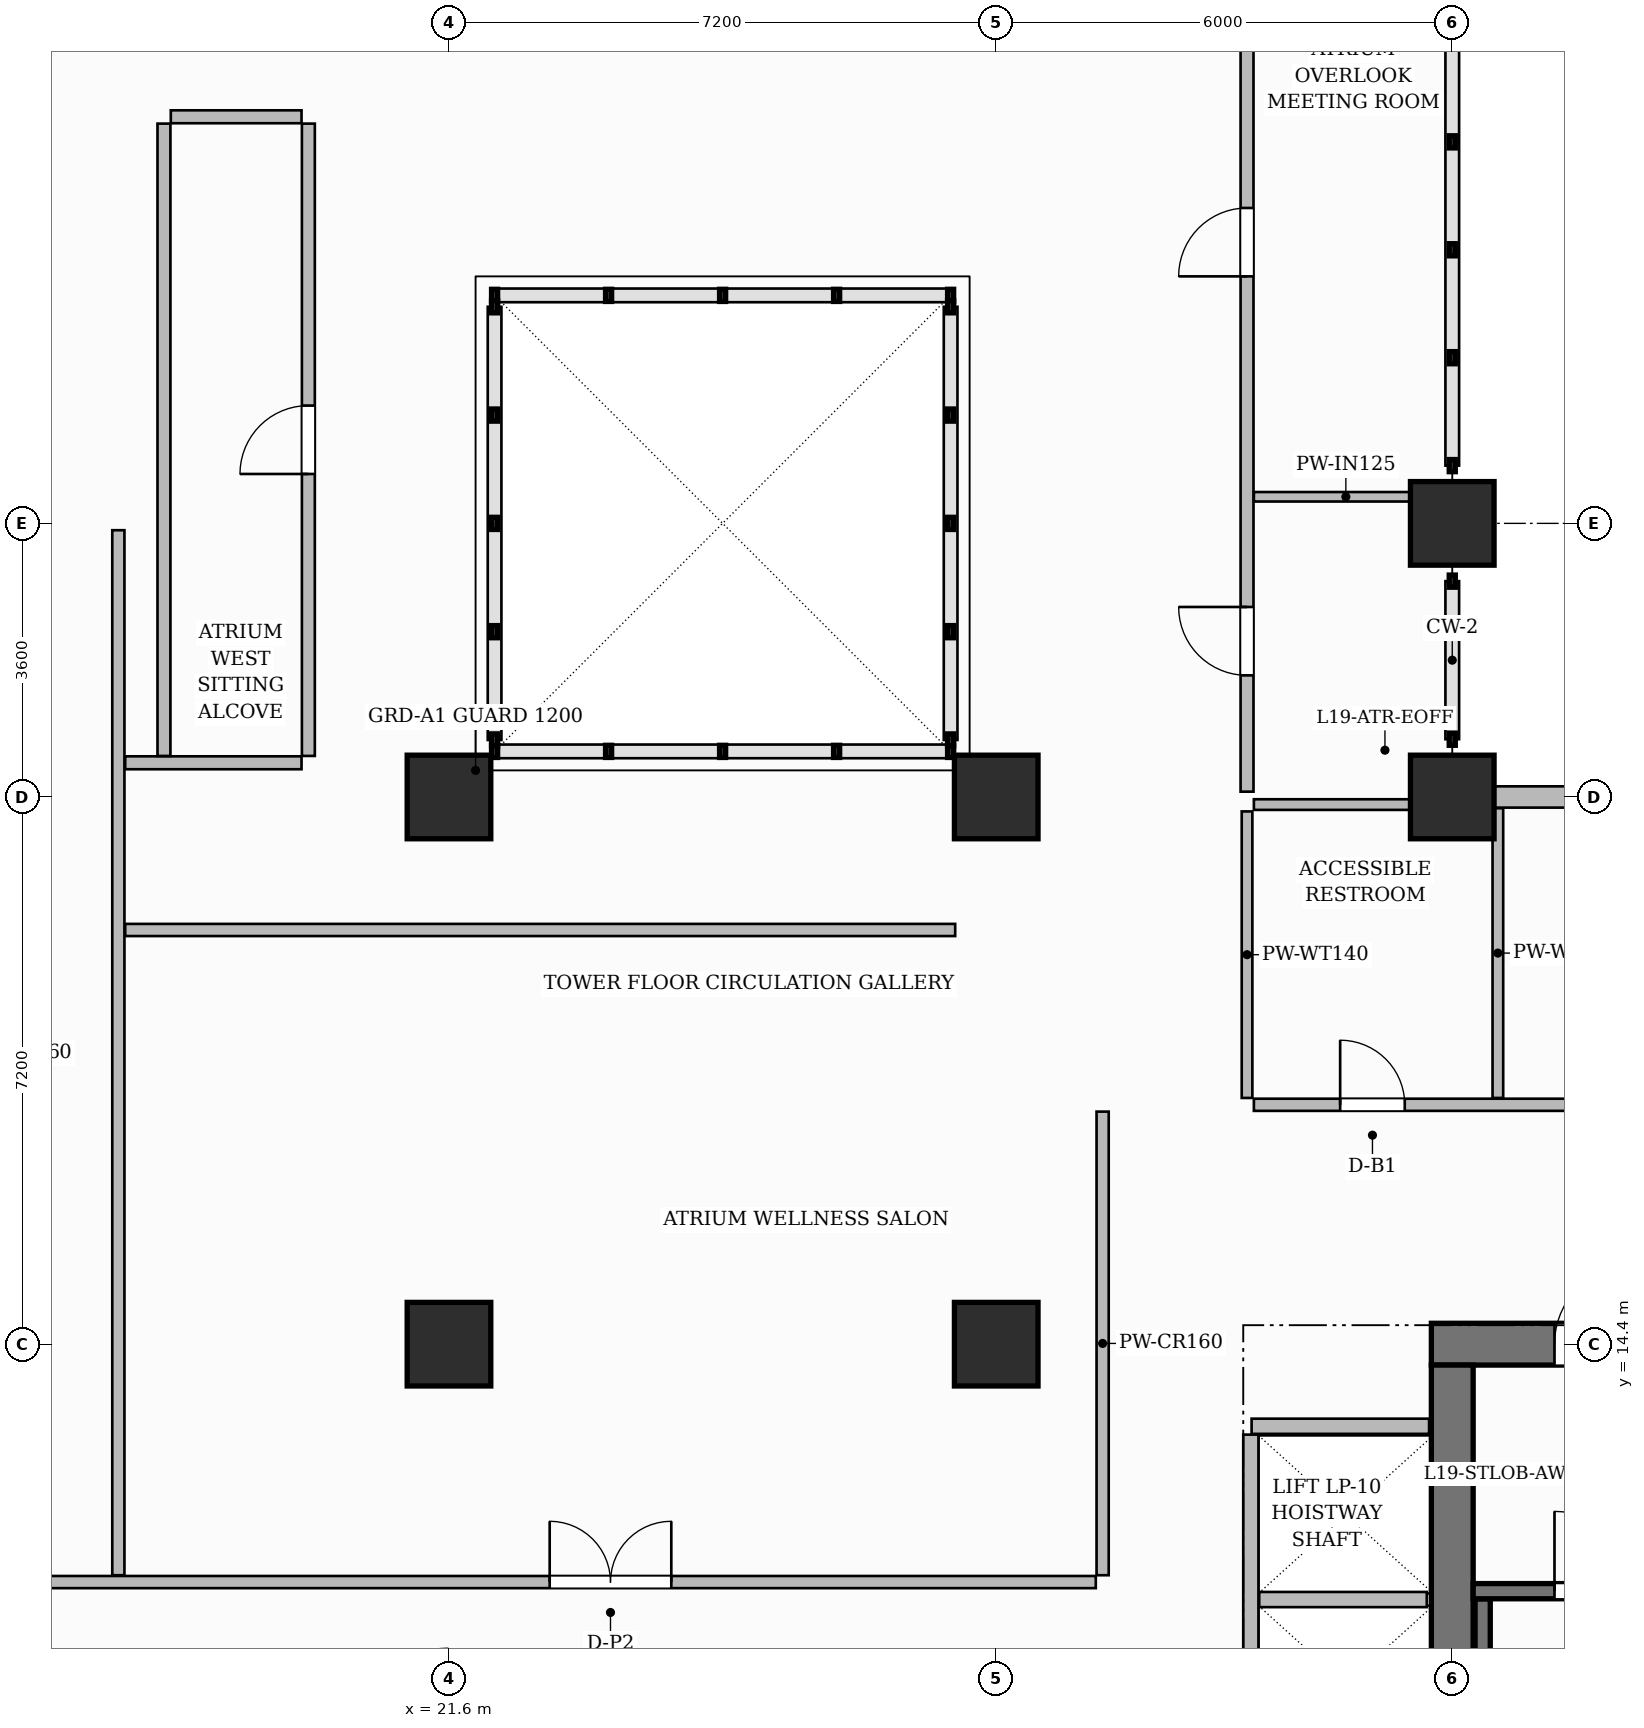
"""IFC4 building model, lengths in metres.
Left out: names, types, materials, properties, quantities, classifications, styles, units other than length and angle.
Written with IfcOpenShell. Run it as: python <this file> out.ifc"""

import sys

from ifc_helpers import new_model, si_unit, direction, frame, frame_2d, origin, origin_2d, place, context, subcontext, project, spatial, rectangle, extrude, source, transform, mapped, element, fill, save


model = new_model("IFC4")
c1 = context("Model", 3, precision=1e-05, world=origin(), true_north=direction((0.0, 1.0)))
c2 = subcontext(c1, "Body", "Model", "MODEL_VIEW")
j1 = project(units=[si_unit("LENGTHUNIT", "METRE"), si_unit("PLANEANGLEUNIT", "RADIAN")], contexts=[c1])
p1 = place(None, origin())
s1 = spatial("IfcSite", under=j1, at=p1, CompositionType="ELEMENT")
p2 = place(p1, origin())
s2 = spatial("IfcBuilding", under=s1, at=p2, CompositionType="ELEMENT")
p3 = place(p2, frame((0.0, 0.0, 80.5)))
s3 = spatial("IfcBuildingStorey", under=s2, at=p3, CompositionType="ELEMENT", Elevation=80.5)
p4 = place(p3, frame((34.525, 14.4, 0.0), z_axis=(0.0, 0.0, 1.0), x_axis=(1.0, 0.0, 0.0)))
e1 = element("IfcWall", 1, at=p4, inside=s3, PredefinedType="SHEAR", context=c2, shape_type="SweptSolid", body=[
    extrude(rectangle(XDim=15.55, YDim=0.55, at=frame_2d((7.775, 0.0))), origin(), (0.0, 0.0, 1.0), 3.7),
])
p5 = place(p4, frame((5.405, 0.0, 0.0)))
e2 = element("IfcOpeningElement", 2, at=p5, cuts=e1, PredefinedType="OPENING", context=c2, shape_type="SweptSolid", body=[
    extrude(rectangle(XDim=1.5, YDim=2.2, at=frame_2d((0.75, 1.1))), frame((0.0, 0.285, 0.0), z_axis=(0.0, -1.0, 0.0), x_axis=(1.0, 0.0, 0.0)), (0.0, 0.0, 1.0), 0.57),
])
p6 = place(p4, frame((1.62, 0.0, 0.0)))
e3 = element("IfcOpeningElement", 3, at=p6, cuts=e1, PredefinedType="OPENING", context=c2, shape_type="SweptSolid", body=[
    extrude(rectangle(XDim=1.05, YDim=2.15, at=frame_2d((0.525, 1.075))), frame((0.0, 0.285, 0.0), z_axis=(0.0, -1.0, 0.0), x_axis=(1.0, 0.0, 0.0)), (0.0, 0.0, 1.0), 0.57),
])
p7 = place(p4, frame((11.25, 0.0, 0.0)))
e4 = element("IfcOpeningElement", 4, at=p7, cuts=e1, PredefinedType="OPENING", context=c2, shape_type="SweptSolid", body=[
    extrude(rectangle(XDim=1.05, YDim=2.15, at=frame_2d((0.525, 1.075))), frame((0.0, 0.285, 0.0), z_axis=(0.0, -1.0, 0.0), x_axis=(1.0, 0.0, 0.0)), (0.0, 0.0, 1.0), 0.57),
])
p8 = place(p3, frame((34.8, 3.875, 0.0), z_axis=(0.0, 0.0, 1.0), x_axis=(0.0, 1.0, 0.0)))
e5 = element("IfcWall", 5, at=p8, inside=s3, PredefinedType="SHEAR", context=c2, shape_type="SweptSolid", body=[
    extrude(rectangle(XDim=10.25, YDim=0.55, at=frame_2d((5.125, 0.0))), origin(), (0.0, 0.0, 1.0), 3.7),
])
m1 = source(origin(), c2, "Body", "SweptSolid", [
    extrude(rectangle(XDim=1.1, YDim=1.1, at=origin_2d()), origin(), (0.0, 0.0, 1.0), 3.7),
])
for number, where, z_axis, x_axis in (
    (6, (21.6, 14.4, 0.0), (0.0, 0.0, 1.0), (1.0, 0.0, 0.0)),
    (7, (21.6, 21.6, 0.0), (0.0, 0.0, 1.0), (1.0, 0.0, 0.0)),
    (8, (28.8, 14.4, 0.0), (0.0, 0.0, 1.0), (1.0, 0.0, 0.0)),
    (9, (28.8, 21.6, 0.0), (0.0, 0.0, 1.0), (1.0, 0.0, 0.0)),
    (10, (34.8, 21.6, 0.0), (0.0, 0.0, 1.0), (1.0, 0.0, 0.0)),
    (11, (34.8, 25.2, 0.0), (0.0, 0.0, 1.0), (1.0, 0.0, 0.0)),
):
    element("IfcColumn", number, at=place(p3, frame(where, z_axis=z_axis, x_axis=x_axis)), inside=s3, PredefinedType="COLUMN", context=c2, shape_type="MappedRepresentation", body=[
        mapped(m1, transform((0.0, 0.0, 0.0), scale=1.0)),
    ])
p9 = place(p3, frame((35.2, 4.1, 0.0), z_axis=(0.0, 0.0, 1.0), x_axis=(0.0, 1.0, 0.0)))
e12 = element("IfcWall", 12, at=p9, inside=s3, PredefinedType="SHEAR", context=c2, shape_type="SweptSolid", body=[
    extrude(rectangle(XDim=6.95, YDim=0.2, at=frame_2d((3.475, 0.0))), origin(), (0.0, 0.0, 1.0), 3.7),
])
p10 = place(p3, frame((35.075, 11.15, 0.0), z_axis=(0.0, 0.0, 1.0), x_axis=(1.0, 0.0, 0.0)))
e13 = element("IfcWall", 13, at=p10, inside=s3, PredefinedType="SHEAR", context=c2, shape_type="SweptSolid", body=[
    extrude(rectangle(XDim=3.165, YDim=0.2, at=frame_2d((1.583, 0.0))), origin(), (0.0, 0.0, 1.0), 3.7),
])
p11 = place(p10, frame((1.07, 0.0, 0.0)))
e14 = element("IfcOpeningElement", 14, at=p11, cuts=e13, PredefinedType="OPENING", context=c2, shape_type="SweptSolid", body=[
    extrude(rectangle(XDim=1.05, YDim=2.2, at=frame_2d((0.525, 1.1))), frame((0.0, 0.11, 0.0), z_axis=(0.0, -1.0, 0.0), x_axis=(1.0, 0.0, 0.0)), (0.0, 0.0, 1.0), 0.22),
])
p12 = place(p3, frame((32.16, 13.32, 0.0), z_axis=(0.0, 0.0, 1.0), x_axis=(1.0, 0.0, 0.0)))
e15 = element("IfcWall", 15, at=p12, inside=s3, PredefinedType="PARTITIONING", context=c2, shape_type="SweptSolid", body=[
    extrude(rectangle(XDim=2.335, YDim=0.2, at=frame_2d((1.167, 0.0))), origin(), (0.0, 0.0, 1.0), 3.45),
])
p13 = place(p3, frame((32.15, 4.39, 0.0), z_axis=(0.0, 0.0, 1.0), x_axis=(0.0, 1.0, 0.0)))
e16 = element("IfcWall", 16, at=p13, inside=s3, PredefinedType="PARTITIONING", context=c2, shape_type="SweptSolid", body=[
    extrude(rectangle(XDim=8.82, YDim=0.2, at=frame_2d((4.41, 0.0))), origin(), (0.0, 0.0, 1.0), 3.45),
])
p14 = place(p3, frame((32.26, 11.04, 0.0), z_axis=(0.0, 0.0, 1.0), x_axis=(1.0, 0.0, 0.0)))
e17 = element("IfcWall", 17, at=p14, inside=s3, PredefinedType="PARTITIONING", context=c2, shape_type="SweptSolid", body=[
    extrude(rectangle(XDim=2.205, YDim=0.2, at=frame_2d((1.103, 0.0))), origin(), (0.0, 0.0, 1.0), 3.45),
])
p15 = place(p3, frame((14.548, 11.27, 0.0), z_axis=(0.0, 0.0, 1.0), x_axis=(1.0, 0.0, 0.0)))
e18 = element("IfcWall", 18, at=p15, inside=s3, PredefinedType="PARTITIONING", context=c2, shape_type="SweptSolid", body=[
    extrude(rectangle(XDim=15.562, YDim=0.16, at=frame_2d((7.781, 0.0))), origin(), (0.0, 0.0, 1.0), 3.45),
])
p16 = place(p15, frame((8.377, 0.0, 0.0)))
e19 = element("IfcOpeningElement", 19, at=p16, cuts=e18, PredefinedType="OPENING", context=c2, shape_type="SweptSolid", body=[
    extrude(rectangle(XDim=1.6, YDim=2.4, at=frame_2d((0.8, 1.2))), frame((0.0, 0.09, 0.0), z_axis=(0.0, -1.0, 0.0), x_axis=(1.0, 0.0, 0.0)), (0.0, 0.0, 1.0), 0.18),
])
p17 = place(p3, frame((30.2, 11.36, 0.0), z_axis=(0.0, 0.0, 1.0), x_axis=(0.0, 1.0, 0.0)))
e20 = element("IfcWall", 20, at=p17, inside=s3, PredefinedType="PARTITIONING", context=c2, shape_type="SweptSolid", body=[
    extrude(rectangle(XDim=6.1, YDim=0.16, at=frame_2d((3.05, 0.0))), origin(), (0.0, 0.0, 1.0), 3.45),
])
p18 = place(p3, frame((32.19, 17.55, 0.0), z_axis=(0.0, 0.0, 1.0), x_axis=(1.0, 0.0, 0.0)))
e21 = element("IfcWall", 21, at=p18, inside=s3, PredefinedType="PARTITIONING", context=c2, shape_type="SweptSolid", body=[
    extrude(rectangle(XDim=17.47, YDim=0.16, at=frame_2d((8.735, 0.0))), origin(), (0.0, 0.0, 1.0), 3.45),
])
p19 = place(p18, frame((1.135, 0.0, 0.0)))
e22 = element("IfcOpeningElement", 22, at=p19, cuts=e21, PredefinedType="OPENING", context=c2, shape_type="SweptSolid", body=[
    extrude(rectangle(XDim=0.85, YDim=2.1, at=frame_2d((0.425, 1.05))), frame((0.0, 0.09, 0.0), z_axis=(0.0, -1.0, 0.0), x_axis=(1.0, 0.0, 0.0)), (0.0, 0.0, 1.0), 0.18),
])
p20 = place(p18, frame((4.76, 0.0, 0.0)))
e23 = element("IfcOpeningElement", 23, at=p20, cuts=e21, PredefinedType="OPENING", context=c2, shape_type="SweptSolid", body=[
    extrude(rectangle(XDim=0.9, YDim=2.15, at=frame_2d((0.45, 1.075))), frame((0.0, 0.09, 0.0), z_axis=(0.0, -1.0, 0.0), x_axis=(1.0, 0.0, 0.0)), (0.0, 0.0, 1.0), 0.18),
])
p21 = place(p18, frame((8.735, 0.0, 0.0)))
e24 = element("IfcOpeningElement", 24, at=p21, cuts=e21, PredefinedType="OPENING", context=c2, shape_type="SweptSolid", body=[
    extrude(rectangle(XDim=0.95, YDim=2.15, at=frame_2d((0.475, 1.075))), frame((0.0, 0.09, 0.0), z_axis=(0.0, -1.0, 0.0), x_axis=(1.0, 0.0, 0.0)), (0.0, 0.0, 1.0), 0.18),
])
p22 = place(p18, frame((14.335, 0.0, 0.0)))
e25 = element("IfcOpeningElement", 25, at=p22, cuts=e21, PredefinedType="OPENING", context=c2, shape_type="SweptSolid", body=[
    extrude(rectangle(XDim=0.95, YDim=2.15, at=frame_2d((0.475, 1.075))), frame((0.0, 0.09, 0.0), z_axis=(0.0, -1.0, 0.0), x_axis=(1.0, 0.0, 0.0)), (0.0, 0.0, 1.0), 0.18),
])
p23 = place(p3, frame((32.1, 17.64, 0.0), z_axis=(0.0, 0.0, 1.0), x_axis=(0.0, 1.0, 0.0)))
e26 = element("IfcWall", 26, at=p23, inside=s3, PredefinedType="PARTITIONING", context=c2, shape_type="SweptSolid", body=[
    extrude(rectangle(XDim=3.77, YDim=0.14, at=frame_2d((1.885, 0.0))), origin(), (0.0, 0.0, 1.0), 3.45),
])
p24 = place(p3, frame((35.4, 17.64, 0.0), z_axis=(0.0, 0.0, 1.0), x_axis=(0.0, 1.0, 0.0)))
e27 = element("IfcWall", 27, at=p24, inside=s3, PredefinedType="PARTITIONING", context=c2, shape_type="SweptSolid", body=[
    extrude(rectangle(XDim=3.812, YDim=0.14, at=frame_2d((1.906, 0.0))), origin(), (0.0, 0.0, 1.0), 3.45),
])
p25 = place(p3, frame((17.25, 11.36, 0.0), z_axis=(0.0, 0.0, 1.0), x_axis=(0.0, 1.0, 0.0)))
e28 = element("IfcWall", 28, at=p25, inside=s3, PredefinedType="PARTITIONING", context=c2, shape_type="SweptSolid", body=[
    extrude(rectangle(XDim=13.75, YDim=0.16, at=frame_2d((6.875, 0.0))), origin(), (0.0, 0.0, 1.0), 3.45),
])
p26 = place(p3, frame((17.34, 22.05, 0.0), z_axis=(0.0, 0.0, 1.0), x_axis=(1.0, 0.0, 0.0)))
e29 = element("IfcWall", 29, at=p26, inside=s3, PredefinedType="PARTITIONING", context=c2, shape_type="SweptSolid", body=[
    extrude(rectangle(XDim=2.32, YDim=0.17, at=frame_2d((1.16, 0.0))), origin(), (0.0, 0.0, 1.0), 3.45),
])
p27 = place(p3, frame((17.94, 30.55, 0.0), z_axis=(0.0, 0.0, 1.0), x_axis=(1.0, 0.0, 0.0)))
e30 = element("IfcWall", 30, at=p27, inside=s3, PredefinedType="PARTITIONING", context=c2, shape_type="SweptSolid", body=[
    extrude(rectangle(XDim=1.72, YDim=0.17, at=frame_2d((0.86, 0.0))), origin(), (0.0, 0.0, 1.0), 3.45),
])
p28 = place(p3, frame((17.85, 22.14, 0.0), z_axis=(0.0, 0.0, 1.0), x_axis=(0.0, 1.0, 0.0)))
e31 = element("IfcWall", 31, at=p28, inside=s3, PredefinedType="PARTITIONING", context=c2, shape_type="SweptSolid", body=[
    extrude(rectangle(XDim=8.32, YDim=0.17, at=frame_2d((4.16, 0.0))), origin(), (0.0, 0.0, 1.0), 3.45),
])
p29 = place(p3, frame((19.75, 22.14, 0.0), z_axis=(0.0, 0.0, 1.0), x_axis=(0.0, 1.0, 0.0)))
e32 = element("IfcWall", 32, at=p29, inside=s3, PredefinedType="PARTITIONING", context=c2, shape_type="SweptSolid", body=[
    extrude(rectangle(XDim=8.32, YDim=0.17, at=frame_2d((4.16, 0.0))), origin(), (0.0, 0.0, 1.0), 3.45),
])
p30 = place(p29, frame((3.71, 0.0, 0.0)))
e33 = element("IfcOpeningElement", 33, at=p30, cuts=e32, PredefinedType="OPENING", context=c2, shape_type="SweptSolid", body=[
    extrude(rectangle(XDim=0.9, YDim=2.15, at=frame_2d((0.45, 1.075))), frame((0.0, 0.095, 0.0), z_axis=(0.0, -1.0, 0.0), x_axis=(1.0, 0.0, 0.0)), (0.0, 0.0, 1.0), 0.19),
])
p31 = place(p3, frame((17.34, 19.85, 0.0), z_axis=(0.0, 0.0, 1.0), x_axis=(1.0, 0.0, 0.0)))
e34 = element("IfcWall", 34, at=p31, inside=s3, PredefinedType="PARTITIONING", context=c2, shape_type="SweptSolid", body=[
    extrude(rectangle(XDim=10.92, YDim=0.16, at=frame_2d((5.46, 0.0))), origin(), (0.0, 0.0, 1.0), 3.45),
])
p32 = place(p3, frame((32.19, 21.5, 0.0), z_axis=(0.0, 0.0, 1.0), x_axis=(1.0, 0.0, 0.0)))
e35 = element("IfcWall", 35, at=p32, inside=s3, PredefinedType="PARTITIONING", context=c2, shape_type="SweptSolid", body=[
    extrude(rectangle(XDim=2.42, YDim=0.14, at=frame_2d((1.21, 0.0))), origin(), (0.0, 0.0, 1.0), 2.885),
])
p33 = place(p3, frame((32.1, 21.67, 0.0), z_axis=(0.0, 0.0, 1.0), x_axis=(0.0, 1.0, 0.0)))
e36 = element("IfcWall", 36, at=p33, inside=s3, PredefinedType="PARTITIONING", context=c2, shape_type="SweptSolid", body=[
    extrude(rectangle(XDim=10.702, YDim=0.17, at=frame_2d((5.351, 0.0))), origin(), (0.0, 0.0, 1.0), 3.45),
])
p34 = place(p33, frame((1.53, 0.0, 0.0)))
e37 = element("IfcOpeningElement", 37, at=p34, cuts=e36, PredefinedType="OPENING", context=c2, shape_type="SweptSolid", body=[
    extrude(rectangle(XDim=0.9, YDim=2.15, at=frame_2d((0.45, 1.075))), frame((0.0, 0.095, 0.0), z_axis=(0.0, -1.0, 0.0), x_axis=(1.0, 0.0, 0.0)), (0.0, 0.0, 1.0), 0.19),
])
p35 = place(p33, frame((6.78, 0.0, 0.0)))
e38 = element("IfcOpeningElement", 38, at=p35, cuts=e36, PredefinedType="OPENING", context=c2, shape_type="SweptSolid", body=[
    extrude(rectangle(XDim=0.9, YDim=2.15, at=frame_2d((0.45, 1.075))), frame((0.0, 0.095, 0.0), z_axis=(0.0, -1.0, 0.0), x_axis=(1.0, 0.0, 0.0)), (0.0, 0.0, 1.0), 0.19),
])
p36 = place(p3, frame((32.19, 25.55, 0.0), z_axis=(0.0, 0.0, 1.0), x_axis=(1.0, 0.0, 0.0)))
e39 = element("IfcWall", 39, at=p36, inside=s3, PredefinedType="PARTITIONING", context=c2, shape_type="SweptSolid", body=[
    extrude(rectangle(XDim=2.42, YDim=0.125, at=frame_2d((1.21, 0.0))), origin(), (0.0, 0.0, 1.0), 3.45),
])
p37 = place(p3, frame((34.8, 21.6, 0.0), z_axis=(0.0, 0.0, 1.0), x_axis=(1.0, 0.0, 0.0)))
e40 = element("IfcWall", 40, at=p37, inside=s3, PredefinedType="SOLIDWALL", context=c2, shape_type="SweptSolid", body=[
    extrude(rectangle(XDim=22.8, YDim=0.28, at=frame_2d((11.4, 0.0))), origin(), (0.0, 0.0, 1.0), 2.885),
])
p38 = place(p37, frame((1.796, 0.0, 0.8)))
e41 = element("IfcOpeningElement", 41, at=p38, cuts=e40, PredefinedType="OPENING", context=c2, shape_type="SweptSolid", body=[
    extrude(rectangle(XDim=1.8, YDim=1.85, at=frame_2d((0.9, 0.925))), frame((0.0, 0.15, 0.0), z_axis=(0.0, -1.0, 0.0), x_axis=(1.0, 0.0, 0.0)), (0.0, 0.0, 1.0), 0.3),
])
p39 = place(p37, frame((4.929, 0.0, 0.8)))
e42 = element("IfcOpeningElement", 42, at=p39, cuts=e40, PredefinedType="OPENING", context=c2, shape_type="SweptSolid", body=[
    extrude(rectangle(XDim=1.15, YDim=1.8, at=frame_2d((0.575, 0.9))), frame((0.0, 0.15, 0.0), z_axis=(0.0, -1.0, 0.0), x_axis=(1.0, 0.0, 0.0)), (0.0, 0.0, 1.0), 0.3),
])
p40 = place(p37, frame((8.321, 0.0, 0.8)))
e43 = element("IfcOpeningElement", 43, at=p40, cuts=e40, PredefinedType="OPENING", context=c2, shape_type="SweptSolid", body=[
    extrude(rectangle(XDim=0.95, YDim=1.75, at=frame_2d((0.475, 0.875))), frame((0.0, 0.15, 0.0), z_axis=(0.0, -1.0, 0.0), x_axis=(1.0, 0.0, 0.0)), (0.0, 0.0, 1.0), 0.3),
])
p41 = place(p37, frame((11.004, 0.0, 0.8)))
e44 = element("IfcOpeningElement", 44, at=p41, cuts=e40, PredefinedType="OPENING", context=c2, shape_type="SweptSolid", body=[
    extrude(rectangle(XDim=1.8, YDim=1.85, at=frame_2d((0.9, 0.925))), frame((0.0, 0.15, 0.0), z_axis=(0.0, -1.0, 0.0), x_axis=(1.0, 0.0, 0.0)), (0.0, 0.0, 1.0), 0.3),
])
p42 = place(p37, frame((16.475, 0.0, 0.8)))
e45 = element("IfcOpeningElement", 45, at=p42, cuts=e40, PredefinedType="OPENING", context=c2, shape_type="SweptSolid", body=[
    extrude(rectangle(XDim=1.8, YDim=1.85, at=frame_2d((0.9, 0.925))), frame((0.0, 0.15, 0.0), z_axis=(0.0, -1.0, 0.0), x_axis=(1.0, 0.0, 0.0)), (0.0, 0.0, 1.0), 0.3),
])
p43 = place(p37, frame((19.525, 0.0, 0.8)))
e46 = element("IfcOpeningElement", 46, at=p43, cuts=e40, PredefinedType="OPENING", context=c2, shape_type="SweptSolid", body=[
    extrude(rectangle(XDim=1.8, YDim=1.85, at=frame_2d((0.9, 0.925))), frame((0.0, 0.15, 0.0), z_axis=(0.0, -1.0, 0.0), x_axis=(1.0, 0.0, 0.0)), (0.0, 0.0, 1.0), 0.3),
])
m2 = source(origin(), c2, "Body", "SweptSolid", [
    extrude(rectangle(XDim=1.05, YDim=2.2, at=frame_2d((0.525, 1.1))), frame((0.0, 0.025, 0.0), z_axis=(0.0, -1.0, 0.0), x_axis=(1.0, 0.0, 0.0)), (0.0, 0.0, 1.0), 0.05),
])
p44 = place(p11, origin())
e47 = element("IfcDoor", 47, at=p44, inside=s3, OperationType="SINGLE_SWING_LEFT", PredefinedType="DOOR", context=c2, shape_type="MappedRepresentation", body=[
    mapped(m2, transform((0.0, 0.0, 0.0), scale=1.0)),
])
fill(e14, e47)
m3 = source(origin(), c2, "Body", "SweptSolid", [
    extrude(rectangle(XDim=1.05, YDim=2.15, at=frame_2d((0.525, 1.075))), frame((0.0, 0.025, 0.0), z_axis=(0.0, -1.0, 0.0), x_axis=(1.0, 0.0, 0.0)), (0.0, 0.0, 1.0), 0.05),
])
p45 = place(p6, origin())
e48 = element("IfcDoor", 48, at=p45, inside=s3, OperationType="SINGLE_SWING_RIGHT", PredefinedType="DOOR", context=c2, shape_type="MappedRepresentation", body=[
    mapped(m3, transform((0.0, 0.0, 0.0), scale=1.0)),
])
fill(e3, e48)
m4 = source(origin(), c2, "Body", "SweptSolid", [
    extrude(rectangle(XDim=0.85, YDim=2.1, at=frame_2d((0.425, 1.05))), frame((0.0, 0.025, 0.0), z_axis=(0.0, -1.0, 0.0), x_axis=(1.0, 0.0, 0.0)), (0.0, 0.0, 1.0), 0.05),
])
p46 = place(p19, origin())
e49 = element("IfcDoor", 49, at=p46, inside=s3, OperationType="SINGLE_SWING_LEFT", PredefinedType="DOOR", context=c2, shape_type="MappedRepresentation", body=[
    mapped(m4, transform((0.0, 0.0, 0.0), scale=1.0)),
])
fill(e22, e49)
m5 = source(origin(), c2, "Body", "SweptSolid", [
    extrude(rectangle(XDim=0.9, YDim=2.15, at=frame_2d((0.45, 1.075))), frame((0.0, 0.025, 0.0), z_axis=(0.0, -1.0, 0.0), x_axis=(1.0, 0.0, 0.0)), (0.0, 0.0, 1.0), 0.05),
])
p47 = place(p30, origin())
e50 = element("IfcDoor", 50, at=p47, inside=s3, OperationType="SINGLE_SWING_LEFT", PredefinedType="DOOR", context=c2, shape_type="MappedRepresentation", body=[
    mapped(m5, transform((0.0, 0.0, 0.0), scale=1.0)),
])
fill(e33, e50)
p48 = place(p34, origin())
e51 = element("IfcDoor", 51, at=p48, inside=s3, OperationType="SINGLE_SWING_RIGHT", PredefinedType="DOOR", context=c2, shape_type="MappedRepresentation", body=[
    mapped(m5, transform((0.0, 0.0, 0.0), scale=1.0)),
])
fill(e37, e51)
p49 = place(p35, origin())
e52 = element("IfcDoor", 52, at=p49, inside=s3, OperationType="SINGLE_SWING_LEFT", PredefinedType="DOOR", context=c2, shape_type="MappedRepresentation", body=[
    mapped(m5, transform((0.0, 0.0, 0.0), scale=1.0)),
])
fill(e38, e52)
m6 = source(origin(), c2, "Body", "SweptSolid", [
    extrude(rectangle(XDim=1.6, YDim=2.4, at=frame_2d((0.8, 1.2))), frame((0.0, 0.025, 0.0), z_axis=(0.0, -1.0, 0.0), x_axis=(1.0, 0.0, 0.0)), (0.0, 0.0, 1.0), 0.05),
])
p50 = place(p16, origin())
e53 = element("IfcDoor", 53, at=p50, inside=s3, OperationType="DOUBLE_DOOR_SINGLE_SWING", PredefinedType="DOOR", context=c2, shape_type="MappedRepresentation", body=[
    mapped(m6, transform((0.0, 0.0, 0.0), scale=1.0)),
])
fill(e19, e53)
save(model, sys.argv[1])
